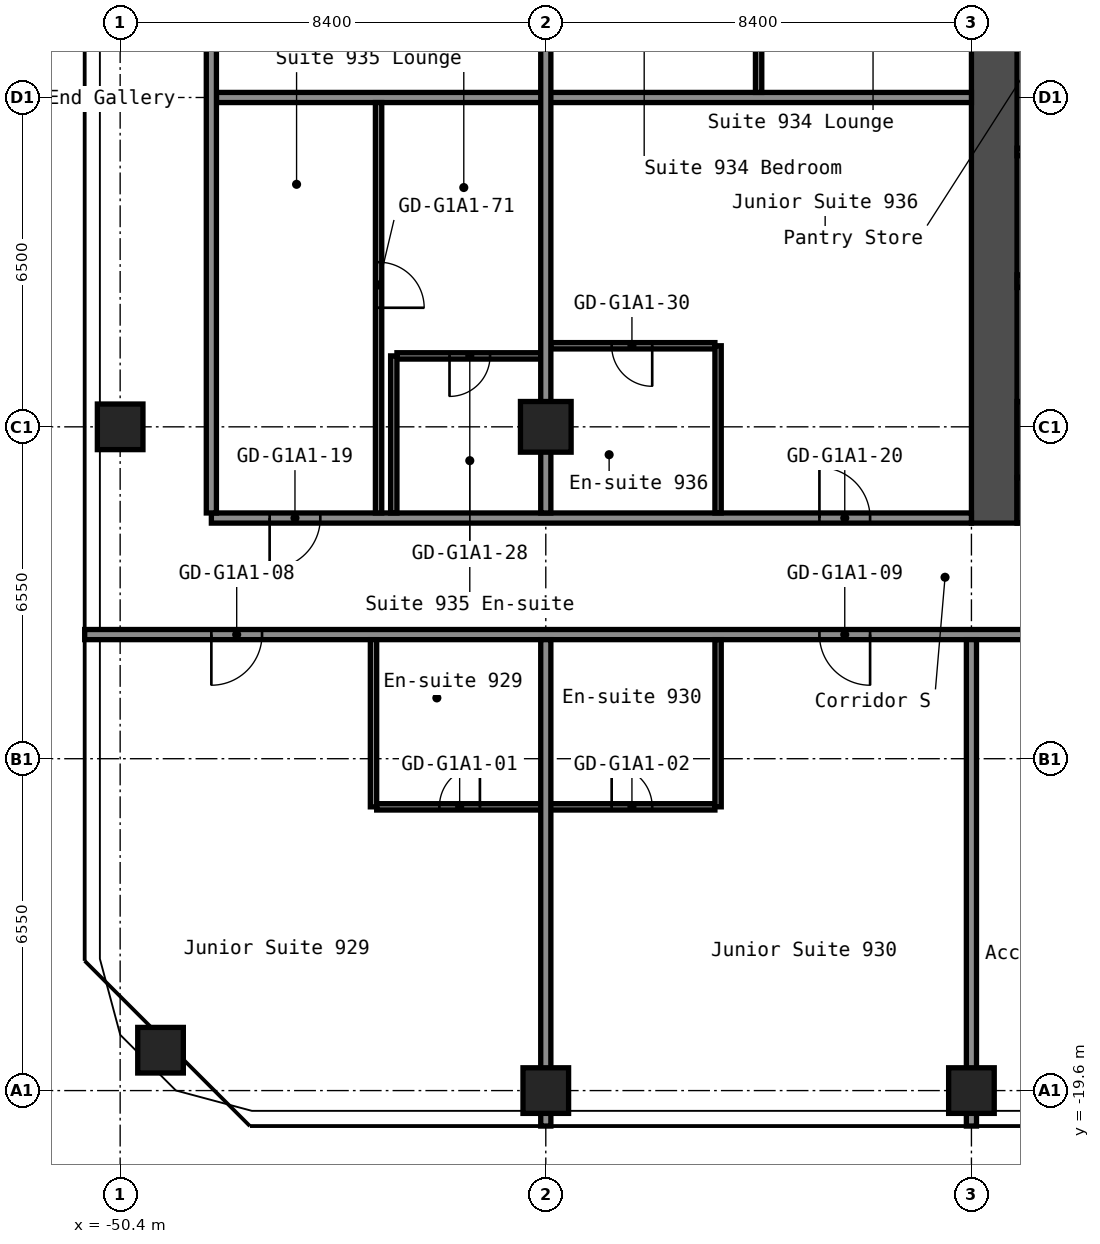
"""IFC4 building model, lengths in metres.
Left out: names, types, materials, properties, quantities, classifications, styles, units other than length and angle.
Written with IfcOpenShell. Run it as: python <this file> out.ifc"""

import sys

from ifc_helpers import new_model, si_unit, direction, frame, frame_2d, origin, origin_2d, place, context, subcontext, project, spatial, rectangle, hollow_rectangle, extrude, element, fill, save


model = new_model("IFC4")
c1 = context("Model", 3, precision=1e-05, world=origin(), true_north=direction((0.0, 1.0)))
c2 = subcontext(c1, "Body", "Model", "MODEL_VIEW")
j1 = project(units=[si_unit("LENGTHUNIT", "METRE"), si_unit("PLANEANGLEUNIT", "RADIAN")], contexts=[c1])
p1 = place(None, origin())
s1 = spatial("IfcSite", under=j1, at=p1, CompositionType="ELEMENT")
p2 = place(p1, origin())
s2 = spatial("IfcBuilding", under=s1, at=p2, CompositionType="ELEMENT")
p3 = place(p2, frame((0.0, 0.0, 35.8)))
s3 = spatial("IfcBuildingStorey", under=s2, at=p3, CompositionType="ELEMENT", Elevation=35.8)
for number, where, z_axis, x_axis in (
    (1, (-49.603, -18.803, 0.0), (0.0, 0.0, 1.0), (1.0, 0.0, 0.0)),
    (2, (-50.4, -6.5, 0.0), (0.0, 0.0, 1.0), (1.0, 0.0, 0.0)),
    (3, (-42.0, -19.6, 0.0), (0.0, 0.0, 1.0), (1.0, 0.0, 0.0)),
):
    element("IfcColumn", number, at=place(p3, frame(where, z_axis=z_axis, x_axis=x_axis)), inside=s3, PredefinedType="COLUMN", context=c2, shape_type="SweptSolid", body=[
        extrude(hollow_rectangle(XDim=0.9, YDim=0.9, WallThickness=0.036, at=origin_2d()), origin(), (0.0, 0.0, 1.0), 2.8),
    ])
p4 = place(p3, frame((-42.0, -6.5, 0.0), z_axis=(0.0, 0.0, 1.0), x_axis=(1.0, 0.0, 0.0)))
e4 = element("IfcColumn", 4, at=p4, inside=s3, PredefinedType="COLUMN", context=c2, shape_type="SweptSolid", body=[
    extrude(hollow_rectangle(XDim=1.0, YDim=1.0, WallThickness=0.04, at=origin_2d()), origin(), (0.0, 0.0, 1.0), 2.8),
])
p5 = place(p3, frame((-33.6, -19.6, 0.0), z_axis=(0.0, 0.0, 1.0), x_axis=(1.0, 0.0, 0.0)))
e5 = element("IfcColumn", 5, at=p5, inside=s3, PredefinedType="COLUMN", context=c2, shape_type="SweptSolid", body=[
    extrude(hollow_rectangle(XDim=0.9, YDim=0.9, WallThickness=0.036, at=origin_2d()), origin(), (0.0, 0.0, 1.0), 2.8),
])
p6 = place(p3, frame((-33.15, -8.4, 0.0), z_axis=(0.0, 0.0, 1.0), x_axis=(0.0, 1.0, 0.0)))
e6 = element("IfcWall", 6, at=p6, inside=s3, PredefinedType="SHEAR", context=c2, shape_type="SweptSolid", body=[
    extrude(rectangle(XDim=16.8, YDim=0.9, at=frame_2d((8.4, 0.0))), origin(), (0.0, 0.0, 1.0), 2.8),
])
p7 = place(p3, frame((-32.7, -7.95, 0.0), z_axis=(0.0, 0.0, 1.0), x_axis=(1.0, 0.0, 0.0)))
e7 = element("IfcWall", 7, at=p7, inside=s3, PredefinedType="SHEAR", context=c2, shape_type="SweptSolid", body=[
    extrude(rectangle(XDim=15.0, YDim=0.9, at=frame_2d((7.5, 0.0))), origin(), (0.0, 0.0, 1.0), 2.8),
])
p8 = place(p7, frame((11.45, 0.0, 0.0)))
e8 = element("IfcOpeningElement", 8, at=p8, cuts=e7, PredefinedType="OPENING", context=c2, shape_type="SweptSolid", body=[
    extrude(rectangle(XDim=1.0, YDim=2.1, at=frame_2d((0.5, 1.05))), frame((0.0, 0.46, 0.0), z_axis=(0.0, -1.0, 0.0), x_axis=(1.0, 0.0, 0.0)), (0.0, 0.0, 1.0), 0.92),
])
p9 = place(p3, frame((-32.7, -3.625, 0.0), z_axis=(0.0, 0.0, 1.0), x_axis=(1.0, 0.0, 0.0)))
e9 = element("IfcWall", 9, at=p9, inside=s3, PredefinedType="SHEAR", context=c2, shape_type="SweptSolid", body=[
    extrude(rectangle(XDim=4.55, YDim=0.25, at=frame_2d((2.275, 0.0))), origin(), (0.0, 0.0, 1.0), 2.8),
])
p10 = place(p9, frame((2.85, 0.0, 0.0)))
e10 = element("IfcOpeningElement", 10, at=p10, cuts=e9, PredefinedType="OPENING", context=c2, shape_type="SweptSolid", body=[
    extrude(rectangle(XDim=1.1, YDim=2.1, at=frame_2d((0.55, 1.05))), frame((0.0, 0.135, 0.0), z_axis=(0.0, -1.0, 0.0), x_axis=(1.0, 0.0, 0.0)), (0.0, 0.0, 1.0), 0.27),
])
p11 = place(p9, frame((0.6, 0.0, 0.0)))
e11 = element("IfcOpeningElement", 11, at=p11, cuts=e9, PredefinedType="OPENING", context=c2, shape_type="SweptSolid", body=[
    extrude(rectangle(XDim=1.1, YDim=2.1, at=frame_2d((0.55, 1.05))), frame((0.0, 0.135, 0.0), z_axis=(0.0, -1.0, 0.0), x_axis=(1.0, 0.0, 0.0)), (0.0, 0.0, 1.0), 0.27),
])
p12 = place(p3, frame((-32.7, -6.75, 0.0), z_axis=(0.0, 0.0, 1.0), x_axis=(1.0, 0.0, 0.0)))
e12 = element("IfcWall", 12, at=p12, inside=s3, PredefinedType="SHEAR", context=c2, shape_type="SweptSolid", body=[
    extrude(rectangle(XDim=4.55, YDim=1.5, at=frame_2d((2.275, 0.0))), origin(), (0.0, 0.0, 1.0), 2.8),
])
p13 = place(p3, frame((-32.7, -1.075, 0.0), z_axis=(0.0, 0.0, 1.0), x_axis=(1.0, 0.0, 0.0)))
e13 = element("IfcWall", 13, at=p13, inside=s3, PredefinedType="PARTITIONING", context=c2, shape_type="SweptSolid", body=[
    extrude(rectangle(XDim=3.0, YDim=0.15, at=frame_2d((1.5, 0.0))), origin(), (0.0, 0.0, 1.0), 2.8),
])
p14 = place(p3, frame((-45.337, -14.0, 0.0), z_axis=(0.0, 0.0, 1.0), x_axis=(1.0, 0.0, 0.0)))
e14 = element("IfcWall", 14, at=p14, inside=s3, PredefinedType="PARTITIONING", context=c2, shape_type="SweptSolid", body=[
    extrude(rectangle(XDim=6.675, YDim=0.125, at=frame_2d((3.337, 0.0))), origin(), (0.0, 0.0, 1.0), 2.8),
])
p15 = place(p14, frame((1.238, 0.0, 0.0)))
e15 = element("IfcOpeningElement", 15, at=p15, cuts=e14, PredefinedType="OPENING", context=c2, shape_type="SweptSolid", body=[
    extrude(rectangle(XDim=0.8, YDim=2.1, at=frame_2d((0.4, 1.05))), frame((0.0, 0.073, 0.0), z_axis=(0.0, -1.0, 0.0), x_axis=(1.0, 0.0, 0.0)), (0.0, 0.0, 1.0), 0.145),
])
p16 = place(p14, frame((4.637, 0.0, 0.0)))
e16 = element("IfcOpeningElement", 16, at=p16, cuts=e14, PredefinedType="OPENING", context=c2, shape_type="SweptSolid", body=[
    extrude(rectangle(XDim=0.8, YDim=2.1, at=frame_2d((0.4, 1.05))), frame((0.0, 0.073, 0.0), z_axis=(0.0, -1.0, 0.0), x_axis=(1.0, 0.0, 0.0)), (0.0, 0.0, 1.0), 0.145),
])
p17 = place(p3, frame((-51.1, -10.6, 0.0), z_axis=(0.0, 0.0, 1.0), x_axis=(1.0, 0.0, 0.0)))
e17 = element("IfcWall", 17, at=p17, inside=s3, PredefinedType="PARTITIONING", context=c2, shape_type="SweptSolid", body=[
    extrude(rectangle(XDim=34.3, YDim=0.2, at=frame_2d((17.15, 0.0))), origin(), (0.0, 0.0, 1.0), 2.8),
])
p18 = place(p17, frame((2.5, 0.0, 0.0)))
e18 = element("IfcOpeningElement", 18, at=p18, cuts=e17, PredefinedType="OPENING", context=c2, shape_type="SweptSolid", body=[
    extrude(rectangle(XDim=1.0, YDim=2.1, at=frame_2d((0.5, 1.05))), frame((0.0, 0.11, 0.0), z_axis=(0.0, -1.0, 0.0), x_axis=(1.0, 0.0, 0.0)), (0.0, 0.0, 1.0), 0.22),
])
p19 = place(p17, frame((14.5, 0.0, 0.0)))
e19 = element("IfcOpeningElement", 19, at=p19, cuts=e17, PredefinedType="OPENING", context=c2, shape_type="SweptSolid", body=[
    extrude(rectangle(XDim=1.0, YDim=2.1, at=frame_2d((0.5, 1.05))), frame((0.0, 0.11, 0.0), z_axis=(0.0, -1.0, 0.0), x_axis=(1.0, 0.0, 0.0)), (0.0, 0.0, 1.0), 0.22),
])
p20 = place(p17, frame((19.4, 0.0, 0.0)))
e20 = element("IfcOpeningElement", 20, at=p20, cuts=e17, PredefinedType="OPENING", context=c2, shape_type="SweptSolid", body=[
    extrude(rectangle(XDim=1.0, YDim=2.1, at=frame_2d((0.5, 1.05))), frame((0.0, 0.11, 0.0), z_axis=(0.0, -1.0, 0.0), x_axis=(1.0, 0.0, 0.0)), (0.0, 0.0, 1.0), 0.22),
])
p21 = place(p17, frame((27.9, 0.0, 0.0)))
e21 = element("IfcOpeningElement", 21, at=p21, cuts=e17, PredefinedType="OPENING", context=c2, shape_type="SweptSolid", body=[
    extrude(rectangle(XDim=1.0, YDim=2.1, at=frame_2d((0.5, 1.05))), frame((0.0, 0.11, 0.0), z_axis=(0.0, -1.0, 0.0), x_axis=(1.0, 0.0, 0.0)), (0.0, 0.0, 1.0), 0.22),
])
p22 = place(p3, frame((-48.6, -8.3, 0.0), z_axis=(0.0, 0.0, 1.0), x_axis=(1.0, 0.0, 0.0)))
e22 = element("IfcWall", 22, at=p22, inside=s3, PredefinedType="PARTITIONING", context=c2, shape_type="SweptSolid", body=[
    extrude(rectangle(XDim=15.0, YDim=0.2, at=frame_2d((7.5, 0.0))), origin(), (0.0, 0.0, 1.0), 2.8),
])
p23 = place(p22, frame((1.15, 0.0, 0.0)))
e23 = element("IfcOpeningElement", 23, at=p23, cuts=e22, PredefinedType="OPENING", context=c2, shape_type="SweptSolid", body=[
    extrude(rectangle(XDim=1.0, YDim=2.1, at=frame_2d((0.5, 1.05))), frame((0.0, 0.11, 0.0), z_axis=(0.0, -1.0, 0.0), x_axis=(1.0, 0.0, 0.0)), (0.0, 0.0, 1.0), 0.22),
])
p24 = place(p22, frame((12.0, 0.0, 0.0)))
e24 = element("IfcOpeningElement", 24, at=p24, cuts=e22, PredefinedType="OPENING", context=c2, shape_type="SweptSolid", body=[
    extrude(rectangle(XDim=1.0, YDim=2.1, at=frame_2d((0.5, 1.05))), frame((0.0, 0.11, 0.0), z_axis=(0.0, -1.0, 0.0), x_axis=(1.0, 0.0, 0.0)), (0.0, 0.0, 1.0), 0.22),
])
p25 = place(p3, frame((-44.938, -5.1, 0.0), z_axis=(0.0, 0.0, 1.0), x_axis=(1.0, 0.0, 0.0)))
e25 = element("IfcWall", 25, at=p25, inside=s3, PredefinedType="PARTITIONING", context=c2, shape_type="SweptSolid", body=[
    extrude(rectangle(XDim=2.837, YDim=0.125, at=frame_2d((1.419, 0.0))), origin(), (0.0, 0.0, 1.0), 2.8),
])
p26 = place(p25, frame((1.038, 0.0, 0.0)))
e26 = element("IfcOpeningElement", 26, at=p26, cuts=e25, PredefinedType="OPENING", context=c2, shape_type="SweptSolid", body=[
    extrude(rectangle(XDim=0.8, YDim=2.1, at=frame_2d((0.4, 1.05))), frame((0.0, 0.073, 0.0), z_axis=(0.0, -1.0, 0.0), x_axis=(1.0, 0.0, 0.0)), (0.0, 0.0, 1.0), 0.145),
])
p27 = place(p3, frame((-41.9, -4.9, 0.0), z_axis=(0.0, 0.0, 1.0), x_axis=(1.0, 0.0, 0.0)))
e27 = element("IfcWall", 27, at=p27, inside=s3, PredefinedType="PARTITIONING", context=c2, shape_type="SweptSolid", body=[
    extrude(rectangle(XDim=3.237, YDim=0.125, at=frame_2d((1.619, 0.0))), origin(), (0.0, 0.0, 1.0), 2.8),
])
p28 = place(p27, frame((1.2, 0.0, 0.0)))
e28 = element("IfcOpeningElement", 28, at=p28, cuts=e27, PredefinedType="OPENING", context=c2, shape_type="SweptSolid", body=[
    extrude(rectangle(XDim=0.8, YDim=2.1, at=frame_2d((0.4, 1.05))), frame((0.0, 0.073, 0.0), z_axis=(0.0, -1.0, 0.0), x_axis=(1.0, 0.0, 0.0)), (0.0, 0.0, 1.0), 0.145),
])
p29 = place(p3, frame((-48.5, 0.0, 0.0), z_axis=(0.0, 0.0, 1.0), x_axis=(1.0, 0.0, 0.0)))
e29 = element("IfcWall", 29, at=p29, inside=s3, PredefinedType="PARTITIONING", context=c2, shape_type="SweptSolid", body=[
    extrude(rectangle(XDim=14.9, YDim=0.2, at=frame_2d((7.45, 0.0))), origin(), (0.0, 0.0, 1.0), 2.8),
])
p30 = place(p3, frame((-48.6, -8.2, 0.0), z_axis=(0.0, 0.0, 1.0), x_axis=(0.0, 1.0, 0.0)))
e30 = element("IfcWall", 30, at=p30, inside=s3, PredefinedType="PARTITIONING", context=c2, shape_type="SweptSolid", body=[
    extrude(rectangle(XDim=16.4, YDim=0.2, at=frame_2d((8.2, 0.0))), origin(), (0.0, 0.0, 1.0), 2.8),
])
p31 = place(p3, frame((-45.4, -14.0, 0.0), z_axis=(0.0, 0.0, 1.0), x_axis=(0.0, 1.0, 0.0)))
e31 = element("IfcWall", 31, at=p31, inside=s3, PredefinedType="PARTITIONING", context=c2, shape_type="SweptSolid", body=[
    extrude(rectangle(XDim=3.3, YDim=0.125, at=frame_2d((1.65, 0.0))), origin(), (0.0, 0.0, 1.0), 2.8),
])
p32 = place(p3, frame((-45.3, -8.2, 0.0), z_axis=(0.0, 0.0, 1.0), x_axis=(0.0, 1.0, 0.0)))
e32 = element("IfcWall", 32, at=p32, inside=s3, PredefinedType="PARTITIONING", context=c2, shape_type="SweptSolid", body=[
    extrude(rectangle(XDim=8.1, YDim=0.125, at=frame_2d((4.05, 0.0))), origin(), (0.0, 0.0, 1.0), 2.8),
])
p33 = place(p32, frame((4.05, 0.0, 0.0)))
e33 = element("IfcOpeningElement", 33, at=p33, cuts=e32, PredefinedType="OPENING", context=c2, shape_type="SweptSolid", body=[
    extrude(rectangle(XDim=0.9, YDim=2.1, at=frame_2d((0.45, 1.05))), frame((0.0, 0.073, 0.0), z_axis=(0.0, -1.0, 0.0), x_axis=(1.0, 0.0, 0.0)), (0.0, 0.0, 1.0), 0.145),
])
p34 = place(p3, frame((-45.0, -8.2, 0.0), z_axis=(0.0, 0.0, 1.0), x_axis=(0.0, 1.0, 0.0)))
e34 = element("IfcWall", 34, at=p34, inside=s3, PredefinedType="PARTITIONING", context=c2, shape_type="SweptSolid", body=[
    extrude(rectangle(XDim=3.1, YDim=0.125, at=frame_2d((1.55, 0.0))), origin(), (0.0, 0.0, 1.0), 2.8),
])
p35 = place(p3, frame((-42.0, -20.3, 0.0), z_axis=(0.0, 0.0, 1.0), x_axis=(0.0, 1.0, 0.0)))
e35 = element("IfcWall", 35, at=p35, inside=s3, PredefinedType="PARTITIONING", context=c2, shape_type="SweptSolid", body=[
    extrude(rectangle(XDim=9.6, YDim=0.2, at=frame_2d((4.8, 0.0))), origin(), (0.0, 0.0, 1.0), 2.8),
])
p36 = place(p3, frame((-42.0, -8.2, 0.0), z_axis=(0.0, 0.0, 1.0), x_axis=(0.0, 1.0, 0.0)))
e36 = element("IfcWall", 36, at=p36, inside=s3, PredefinedType="PARTITIONING", context=c2, shape_type="SweptSolid", body=[
    extrude(rectangle(XDim=16.4, YDim=0.2, at=frame_2d((8.2, 0.0))), origin(), (0.0, 0.0, 1.0), 2.8),
])
for number, where, z_axis, x_axis in (
    (37, (-38.6, -14.0, 0.0), (0.0, 0.0, 1.0), (0.0, 1.0, 0.0)),
    (38, (-38.6, -8.2, 0.0), (0.0, 0.0, 1.0), (0.0, 1.0, 0.0)),
):
    element("IfcWall", number, at=place(p3, frame(where, z_axis=z_axis, x_axis=x_axis)), inside=s3, PredefinedType="PARTITIONING", context=c2, shape_type="SweptSolid", body=[
        extrude(rectangle(XDim=3.3, YDim=0.125, at=frame_2d((1.65, 0.0))), origin(), (0.0, 0.0, 1.0), 2.8),
    ])
p37 = place(p3, frame((-37.8, 0.1, 0.0), z_axis=(0.0, 0.0, 1.0), x_axis=(0.0, 1.0, 0.0)))
e39 = element("IfcWall", 39, at=p37, inside=s3, PredefinedType="PARTITIONING", context=c2, shape_type="SweptSolid", body=[
    extrude(rectangle(XDim=8.1, YDim=0.125, at=frame_2d((4.05, 0.0))), origin(), (0.0, 0.0, 1.0), 2.8),
])
p38 = place(p37, frame((3.15, 0.0, 0.0)))
e40 = element("IfcOpeningElement", 40, at=p38, cuts=e39, PredefinedType="OPENING", context=c2, shape_type="SweptSolid", body=[
    extrude(rectangle(XDim=0.9, YDim=2.1, at=frame_2d((0.45, 1.05))), frame((0.0, 0.073, 0.0), z_axis=(0.0, -1.0, 0.0), x_axis=(1.0, 0.0, 0.0)), (0.0, 0.0, 1.0), 0.145),
])
p39 = place(p3, frame((-33.6, -20.3, 0.0), z_axis=(0.0, 0.0, 1.0), x_axis=(0.0, 1.0, 0.0)))
e41 = element("IfcWall", 41, at=p39, inside=s3, PredefinedType="PARTITIONING", context=c2, shape_type="SweptSolid", body=[
    extrude(rectangle(XDim=9.6, YDim=0.2, at=frame_2d((4.8, 0.0))), origin(), (0.0, 0.0, 1.0), 2.8),
])
p40 = place(p15, origin())
e42 = element("IfcDoor", 42, at=p40, inside=s3, OperationType="SINGLE_SWING_LEFT", PredefinedType="DOOR", context=c2, shape_type="SweptSolid", body=[
    extrude(rectangle(XDim=0.8, YDim=2.1, at=frame_2d((0.4, 1.05))), frame((0.0, 0.025, 0.0), z_axis=(0.0, -1.0, 0.0), x_axis=(1.0, 0.0, 0.0)), (0.0, 0.0, 1.0), 0.05),
])
fill(e15, e42)
p41 = place(p16, origin())
e43 = element("IfcDoor", 43, at=p41, inside=s3, OperationType="SINGLE_SWING_RIGHT", PredefinedType="DOOR", context=c2, shape_type="SweptSolid", body=[
    extrude(rectangle(XDim=0.8, YDim=2.1, at=frame_2d((0.4, 1.05))), frame((0.0, 0.025, 0.0), z_axis=(0.0, -1.0, 0.0), x_axis=(1.0, 0.0, 0.0)), (0.0, 0.0, 1.0), 0.05),
])
fill(e16, e43)
p42 = place(p18, origin())
e44 = element("IfcDoor", 44, at=p42, inside=s3, OperationType="SINGLE_SWING_LEFT", PredefinedType="DOOR", context=c2, shape_type="SweptSolid", body=[
    extrude(rectangle(XDim=1.0, YDim=2.1, at=frame_2d((0.5, 1.05))), frame((0.0, 0.025, 0.0), z_axis=(0.0, -1.0, 0.0), x_axis=(1.0, 0.0, 0.0)), (0.0, 0.0, 1.0), 0.05),
])
fill(e18, e44)
p43 = place(p19, origin())
e45 = element("IfcDoor", 45, at=p43, inside=s3, OperationType="SINGLE_SWING_RIGHT", PredefinedType="DOOR", context=c2, shape_type="SweptSolid", body=[
    extrude(rectangle(XDim=1.0, YDim=2.1, at=frame_2d((0.5, 1.05))), frame((0.0, 0.025, 0.0), z_axis=(0.0, -1.0, 0.0), x_axis=(1.0, 0.0, 0.0)), (0.0, 0.0, 1.0), 0.05),
])
fill(e19, e45)
p44 = place(p23, origin())
e46 = element("IfcDoor", 46, at=p44, inside=s3, OperationType="SINGLE_SWING_LEFT", PredefinedType="DOOR", context=c2, shape_type="SweptSolid", body=[
    extrude(rectangle(XDim=1.0, YDim=2.1, at=frame_2d((0.5, 1.05))), frame((0.0, 0.025, 0.0), z_axis=(0.0, -1.0, 0.0), x_axis=(1.0, 0.0, 0.0)), (0.0, 0.0, 1.0), 0.05),
])
fill(e23, e46)
p45 = place(p24, origin())
e47 = element("IfcDoor", 47, at=p45, inside=s3, OperationType="SINGLE_SWING_RIGHT", PredefinedType="DOOR", context=c2, shape_type="SweptSolid", body=[
    extrude(rectangle(XDim=1.0, YDim=2.1, at=frame_2d((0.5, 1.05))), frame((0.0, 0.025, 0.0), z_axis=(0.0, -1.0, 0.0), x_axis=(1.0, 0.0, 0.0)), (0.0, 0.0, 1.0), 0.05),
])
fill(e24, e47)
p46 = place(p26, origin())
e48 = element("IfcDoor", 48, at=p46, inside=s3, OperationType="SINGLE_SWING_LEFT", PredefinedType="DOOR", context=c2, shape_type="SweptSolid", body=[
    extrude(rectangle(XDim=0.8, YDim=2.1, at=frame_2d((0.4, 1.05))), frame((0.0, 0.025, 0.0), z_axis=(0.0, -1.0, 0.0), x_axis=(1.0, 0.0, 0.0)), (0.0, 0.0, 1.0), 0.05),
])
fill(e26, e48)
p47 = place(p28, origin())
e49 = element("IfcDoor", 49, at=p47, inside=s3, OperationType="SINGLE_SWING_RIGHT", PredefinedType="DOOR", context=c2, shape_type="SweptSolid", body=[
    extrude(rectangle(XDim=0.8, YDim=2.1, at=frame_2d((0.4, 1.05))), frame((0.0, 0.025, 0.0), z_axis=(0.0, -1.0, 0.0), x_axis=(1.0, 0.0, 0.0)), (0.0, 0.0, 1.0), 0.05),
])
fill(e28, e49)
p48 = place(p33, origin())
e50 = element("IfcDoor", 50, at=p48, inside=s3, OperationType="SINGLE_SWING_LEFT", PredefinedType="DOOR", context=c2, shape_type="SweptSolid", body=[
    extrude(rectangle(XDim=0.9, YDim=2.1, at=frame_2d((0.45, 1.05))), frame((0.0, 0.025, 0.0), z_axis=(0.0, -1.0, 0.0), x_axis=(1.0, 0.0, 0.0)), (0.0, 0.0, 1.0), 0.05),
])
fill(e33, e50)
save(model, sys.argv[1])
